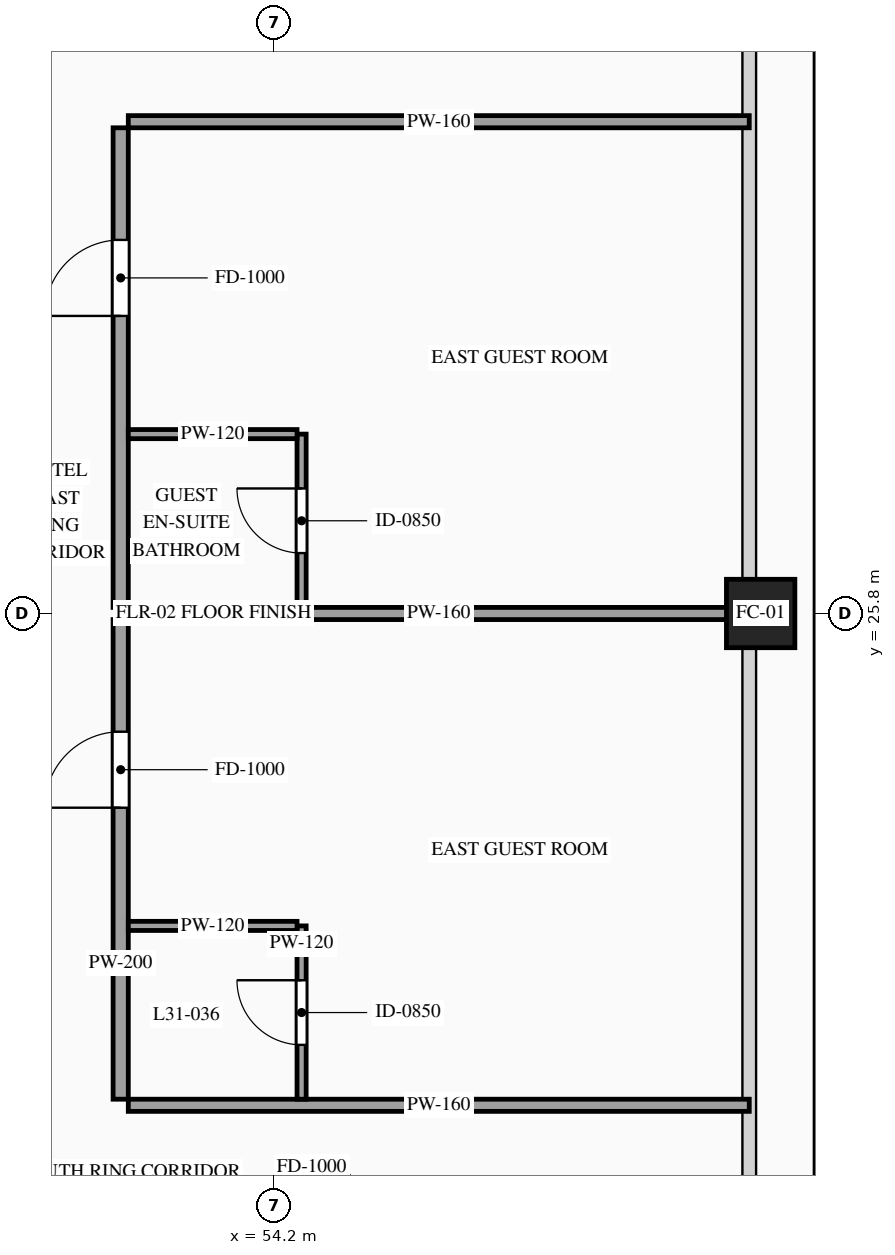
"""IFC4 building model, lengths in metres.
Left out: names, types, materials, properties, quantities, classifications, styles, units other than length and angle.
Written with IfcOpenShell. Run it as: python <this file> out.ifc"""

import sys

from ifc_helpers import new_model, si_unit, direction, frame, frame_2d, origin, origin_2d, place, context, subcontext, project, spatial, rectangle, hollow_rectangle, extrude, source, transform, mapped, element, fill, save


model = new_model("IFC4")
c1 = context("Model", 3, precision=1e-05, world=origin(), true_north=direction((0.0, 1.0)))
c2 = subcontext(c1, "Body", "Model", "MODEL_VIEW")
j1 = project(units=[si_unit("LENGTHUNIT", "METRE"), si_unit("PLANEANGLEUNIT", "RADIAN")], contexts=[c1])
p1 = place(None, origin())
s1 = spatial("IfcSite", under=j1, at=p1, CompositionType="ELEMENT")
p2 = place(p1, origin())
s2 = spatial("IfcBuilding", under=s1, at=p2, CompositionType="ELEMENT")
p3 = place(p2, frame((0.0, 0.0, 119.0)))
s3 = spatial("IfcBuildingStorey", under=s2, at=p3, CompositionType="ELEMENT", Elevation=119.0)
m1 = source(origin(), c2, "Body", "SweptSolid", [
    extrude(hollow_rectangle(XDim=0.9, YDim=0.9, WallThickness=0.042, at=origin_2d()), origin(), (0.0, 0.0, 1.0), 3.6),
])
p4 = place(p3, frame((60.6, 25.8, 0.0), z_axis=(0.0, 0.0, 1.0), x_axis=(1.0, 0.0, 0.0)))
e1 = element("IfcColumn", 1, at=p4, inside=s3, PredefinedType="COLUMN", context=c2, shape_type="MappedRepresentation", body=[
    mapped(m1, transform((0.0, 0.0, 0.0), scale=1.0)),
])
p5 = place(p3, frame((52.18, 19.41, 0.0), z_axis=(0.0, 0.0, 1.0), x_axis=(0.0, 1.0, 0.0)))
e2 = element("IfcWall", 2, at=p5, inside=s3, PredefinedType="PARTITIONING", context=c2, shape_type="SweptSolid", body=[
    extrude(rectangle(XDim=6.31, YDim=0.2, at=frame_2d((3.155, 0.0))), origin(), (0.0, 0.0, 1.0), 3.38),
])
p6 = place(p5, frame((3.835, 0.0, 0.0)))
e3 = element("IfcOpeningElement", 3, at=p6, cuts=e2, PredefinedType="OPENING", context=c2, shape_type="SweptSolid", body=[
    extrude(rectangle(XDim=1.0, YDim=2.2, at=frame_2d((0.5, 1.1))), frame((0.0, 0.115, 0.0), z_axis=(0.0, -1.0, 0.0), x_axis=(1.0, 0.0, 0.0)), (0.0, 0.0, 1.0), 0.23),
])
m2 = source(origin(), c2, "Body", "SweptSolid", [
    extrude(rectangle(XDim=8.17, YDim=0.16, at=frame_2d((4.085, 0.0))), origin(), (0.0, 0.0, 1.0), 2.675),
])
p7 = place(p3, frame((52.28, 25.8, 0.0), z_axis=(0.0, 0.0, 1.0), x_axis=(1.0, 0.0, 0.0)))
e4 = element("IfcWall", 4, at=p7, inside=s3, PredefinedType="PARTITIONING", context=c2, shape_type="MappedRepresentation", body=[
    mapped(m2, transform((0.0, 0.0, 0.0), scale=1.0)),
])
m3 = source(origin(), c2, "Body", "SweptSolid", [
    extrude(rectangle(XDim=8.17, YDim=0.16, at=frame_2d((4.085, 0.0))), origin(), (0.0, 0.0, 1.0), 2.875),
])
p8 = place(p3, frame((52.28, 19.33, 0.0), z_axis=(0.0, 0.0, 1.0), x_axis=(1.0, 0.0, 0.0)))
e5 = element("IfcWall", 5, at=p8, inside=s3, PredefinedType="PARTITIONING", context=c2, shape_type="MappedRepresentation", body=[
    mapped(m3, transform((0.0, 0.0, 0.0), scale=1.0)),
])
p9 = place(p3, frame((54.56, 19.41, 0.0), z_axis=(0.0, 0.0, 1.0), x_axis=(0.0, 1.0, 0.0)))
e6 = element("IfcWall", 6, at=p9, inside=s3, PredefinedType="PARTITIONING", context=c2, shape_type="SweptSolid", body=[
    extrude(rectangle(XDim=2.28, YDim=0.12, at=frame_2d((1.14, 0.0))), origin(), (0.0, 0.0, 1.0), 3.38),
])
p10 = place(p9, frame((0.715, 0.0, 0.0)))
e7 = element("IfcOpeningElement", 7, at=p10, cuts=e6, PredefinedType="OPENING", context=c2, shape_type="SweptSolid", body=[
    extrude(rectangle(XDim=0.85, YDim=2.1, at=frame_2d((0.425, 1.05))), frame((0.0, 0.075, 0.0), z_axis=(0.0, -1.0, 0.0), x_axis=(1.0, 0.0, 0.0)), (0.0, 0.0, 1.0), 0.15),
])
m4 = source(origin(), c2, "Body", "SweptSolid", [
    extrude(rectangle(XDim=2.22, YDim=0.12, at=frame_2d((1.11, 0.0))), origin(), (0.0, 0.0, 1.0), 3.38),
])
p11 = place(p3, frame((52.28, 21.69, 0.0), z_axis=(0.0, 0.0, 1.0), x_axis=(1.0, 0.0, 0.0)))
e8 = element("IfcWall", 8, at=p11, inside=s3, PredefinedType="PARTITIONING", context=c2, shape_type="MappedRepresentation", body=[
    mapped(m4, transform((0.0, 0.0, 0.0), scale=1.0)),
])
p12 = place(p3, frame((52.18, 25.88, 0.0), z_axis=(0.0, 0.0, 1.0), x_axis=(0.0, 1.0, 0.0)))
e9 = element("IfcWall", 9, at=p12, inside=s3, PredefinedType="PARTITIONING", context=c2, shape_type="SweptSolid", body=[
    extrude(rectangle(XDim=6.31, YDim=0.2, at=frame_2d((3.155, 0.0))), origin(), (0.0, 0.0, 1.0), 3.38),
])
p13 = place(p12, frame((3.835, 0.0, 0.0)))
e10 = element("IfcOpeningElement", 10, at=p13, cuts=e9, PredefinedType="OPENING", context=c2, shape_type="SweptSolid", body=[
    extrude(rectangle(XDim=1.0, YDim=2.2, at=frame_2d((0.5, 1.1))), frame((0.0, 0.115, 0.0), z_axis=(0.0, -1.0, 0.0), x_axis=(1.0, 0.0, 0.0)), (0.0, 0.0, 1.0), 0.23),
])
p14 = place(p3, frame((52.28, 32.27, 0.0), z_axis=(0.0, 0.0, 1.0), x_axis=(1.0, 0.0, 0.0)))
e11 = element("IfcWall", 11, at=p14, inside=s3, PredefinedType="PARTITIONING", context=c2, shape_type="MappedRepresentation", body=[
    mapped(m3, transform((0.0, 0.0, 0.0), scale=1.0)),
])
p15 = place(p3, frame((54.56, 25.88, 0.0), z_axis=(0.0, 0.0, 1.0), x_axis=(0.0, 1.0, 0.0)))
e12 = element("IfcWall", 12, at=p15, inside=s3, PredefinedType="PARTITIONING", context=c2, shape_type="SweptSolid", body=[
    extrude(rectangle(XDim=2.28, YDim=0.12, at=frame_2d((1.14, 0.0))), origin(), (0.0, 0.0, 1.0), 3.38),
])
p16 = place(p15, frame((0.715, 0.0, 0.0)))
e13 = element("IfcOpeningElement", 13, at=p16, cuts=e12, PredefinedType="OPENING", context=c2, shape_type="SweptSolid", body=[
    extrude(rectangle(XDim=0.85, YDim=2.1, at=frame_2d((0.425, 1.05))), frame((0.0, 0.075, 0.0), z_axis=(0.0, -1.0, 0.0), x_axis=(1.0, 0.0, 0.0)), (0.0, 0.0, 1.0), 0.15),
])
p17 = place(p3, frame((52.28, 28.16, 0.0), z_axis=(0.0, 0.0, 1.0), x_axis=(1.0, 0.0, 0.0)))
e14 = element("IfcWall", 14, at=p17, inside=s3, PredefinedType="PARTITIONING", context=c2, shape_type="MappedRepresentation", body=[
    mapped(m4, transform((0.0, 0.0, 0.0), scale=1.0)),
])
m5 = source(origin(), c2, "Body", "SweptSolid", [
    extrude(rectangle(XDim=1.0, YDim=2.2, at=frame_2d((0.5, 1.1))), frame((0.0, 0.025, 0.0), z_axis=(0.0, -1.0, 0.0), x_axis=(1.0, 0.0, 0.0)), (0.0, 0.0, 1.0), 0.05),
])
p18 = place(p6, origin())
e15 = element("IfcDoor", 15, at=p18, inside=s3, OperationType="SINGLE_SWING_LEFT", PredefinedType="DOOR", context=c2, shape_type="MappedRepresentation", body=[
    mapped(m5, transform((0.0, 0.0, 0.0), scale=1.0)),
])
fill(e3, e15)
m6 = source(origin(), c2, "Body", "SweptSolid", [
    extrude(rectangle(XDim=0.85, YDim=2.1, at=frame_2d((0.425, 1.05))), frame((0.0, 0.025, 0.0), z_axis=(0.0, -1.0, 0.0), x_axis=(1.0, 0.0, 0.0)), (0.0, 0.0, 1.0), 0.05),
])
p19 = place(p10, origin())
e16 = element("IfcDoor", 16, at=p19, inside=s3, OperationType="SINGLE_SWING_RIGHT", PredefinedType="DOOR", context=c2, shape_type="MappedRepresentation", body=[
    mapped(m6, transform((0.0, 0.0, 0.0), scale=1.0)),
])
fill(e7, e16)
p20 = place(p13, origin())
e17 = element("IfcDoor", 17, at=p20, inside=s3, OperationType="SINGLE_SWING_LEFT", PredefinedType="DOOR", context=c2, shape_type="MappedRepresentation", body=[
    mapped(m5, transform((0.0, 0.0, 0.0), scale=1.0)),
])
fill(e10, e17)
p21 = place(p16, origin())
e18 = element("IfcDoor", 18, at=p21, inside=s3, OperationType="SINGLE_SWING_RIGHT", PredefinedType="DOOR", context=c2, shape_type="MappedRepresentation", body=[
    mapped(m6, transform((0.0, 0.0, 0.0), scale=1.0)),
])
fill(e13, e18)
save(model, sys.argv[1])
